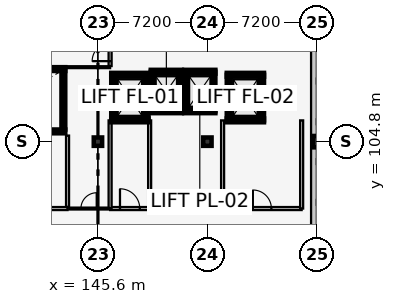
"""IFC4 building model, lengths in metres.
Left out: names, types, materials, properties, quantities, classifications, styles, units other than length and angle.
Written with IfcOpenShell. Run it as: python <this file> out.ifc"""

import sys

from ifc_helpers import new_model, si_unit, direction, frame, frame_2d, origin, origin_2d, place, context, subcontext, project, spatial, rectangle, extrude, element, fill, save


model = new_model("IFC4")
c1 = context("Model", 3, precision=1e-05, world=origin(), true_north=direction((0.0, 1.0)))
c2 = subcontext(c1, "Body", "Model", "MODEL_VIEW")
j1 = project(units=[si_unit("LENGTHUNIT", "METRE"), si_unit("PLANEANGLEUNIT", "RADIAN")], contexts=[c1])
p1 = place(None, origin())
s1 = spatial("IfcSite", under=j1, at=p1, CompositionType="ELEMENT")
p2 = place(p1, origin())
s2 = spatial("IfcBuilding", under=s1, at=p2, CompositionType="ELEMENT")
p3 = place(p2, frame((0.0, 0.0, 25.8)))
s3 = spatial("IfcBuildingStorey", under=s2, at=p3, CompositionType="ELEMENT", Elevation=25.8)
for number, where, z_axis, x_axis in (
    (1, (145.6, 104.8, 0.0), (0.0, 0.0, 1.0), (1.0, 0.0, 0.0)),
    (2, (152.8, 104.8, 0.0), (0.0, 0.0, 1.0), (1.0, 0.0, 0.0)),
):
    element("IfcColumn", number, at=place(p3, frame(where, z_axis=z_axis, x_axis=x_axis)), inside=s3, PredefinedType="COLUMN", context=c2, shape_type="SweptSolid", body=[
        extrude(rectangle(XDim=0.55, YDim=0.55, at=origin_2d()), origin(), (0.0, 0.0, 1.0), 3.9),
    ])
p4 = place(p3, frame((160.0, 104.8, 0.0), z_axis=(0.0, 0.0, 1.0), x_axis=(1.0, 0.0, 0.0)))
e3 = element("IfcColumn", 3, at=p4, inside=s3, PredefinedType="COLUMN", context=c2, shape_type="SweptSolid", body=[
    extrude(rectangle(XDim=0.5, YDim=0.75, at=origin_2d()), origin(), (0.0, 0.0, 1.0), 3.9),
])
p5 = place(p3, frame((159.81, 112.0, 0.0), z_axis=(0.0, 0.0, 1.0), x_axis=(0.0, -1.0, 0.0)))
e4 = element("IfcWall", 4, at=p5, inside=s3, PredefinedType="SOLIDWALL", context=c2, shape_type="SweptSolid", body=[
    extrude(rectangle(XDim=28.8, YDim=0.38, at=frame_2d((14.4, 0.0))), origin(), (0.0, 0.0, 1.0), 3.045),
])
for number, where, z_axis, x_axis in (
    (5, (134.55, 105.475, 0.0), (0.0, 0.0, 1.0), (1.0, 0.0, 0.0)),
    (6, (143.45, 109.575, 0.0), (0.0, 0.0, 1.0), (-1.0, 0.0, 0.0)),
):
    element("IfcWall", number, at=place(p3, frame(where, z_axis=z_axis, x_axis=x_axis)), inside=s3, PredefinedType="SHEAR", context=c2, shape_type="SweptSolid", body=[
        extrude(rectangle(XDim=8.9, YDim=0.25, at=frame_2d((4.45, 0.0))), origin(), (0.0, 0.0, 1.0), 3.65),
    ])
p6 = place(p3, frame((143.325, 105.6, 0.0), z_axis=(0.0, 0.0, 1.0), x_axis=(0.0, 1.0, 0.0)))
e7 = element("IfcWall", 7, at=p6, inside=s3, PredefinedType="SHEAR", context=c2, shape_type="SweptSolid", body=[
    extrude(rectangle(XDim=3.85, YDim=0.25, at=frame_2d((1.925, 0.0))), origin(), (0.0, 0.0, 1.0), 3.65),
])
p7 = place(p3, frame((146.475, 106.2, 0.0), z_axis=(0.0, 0.0, 1.0), x_axis=(1.0, 0.0, 0.0)))
e8 = element("IfcWall", 8, at=p7, inside=s3, PredefinedType="SHEAR", context=c2, shape_type="SweptSolid", body=[
    extrude(rectangle(XDim=2.45, YDim=0.25, at=frame_2d((1.225, 0.0))), origin(), (0.0, 0.0, 1.0), 3.65),
])
p8 = place(p7, frame((0.675, 0.0, 0.0)))
e9 = element("IfcOpeningElement", 9, at=p8, cuts=e8, PredefinedType="OPENING", context=c2, shape_type="SweptSolid", body=[
    extrude(rectangle(XDim=1.1, YDim=2.15, at=frame_2d((0.55, 1.075))), frame((0.0, 0.137, 0.0), z_axis=(0.0, -1.0, 0.0), x_axis=(1.0, 0.0, 0.0)), (0.0, 0.0, 1.0), 0.274),
])
p9 = place(p3, frame((148.925, 109.2, 0.0), z_axis=(0.0, 0.0, 1.0), x_axis=(-1.0, 0.0, 0.0)))
e10 = element("IfcWall", 10, at=p9, inside=s3, PredefinedType="SHEAR", context=c2, shape_type="SweptSolid", body=[
    extrude(rectangle(XDim=2.45, YDim=0.25, at=frame_2d((1.225, 0.0))), origin(), (0.0, 0.0, 1.0), 3.65),
])
for number, where, z_axis, x_axis in (
    (11, (146.6, 109.2, 0.0), (0.0, 0.0, 1.0), (0.0, -1.0, 0.0)),
    (12, (148.8, 106.2, 0.0), (0.0, 0.0, 1.0), (0.0, 1.0, 0.0)),
):
    element("IfcWall", number, at=place(p3, frame(where, z_axis=z_axis, x_axis=x_axis)), inside=s3, PredefinedType="SHEAR", context=c2, shape_type="SweptSolid", body=[
        extrude(rectangle(XDim=3.0, YDim=0.25, at=frame_2d((1.5, 0.0))), origin(), (0.0, 0.0, 1.0), 3.65),
    ])
p10 = place(p3, frame((146.4, 100.4, 0.0), z_axis=(0.0, 0.0, 1.0), x_axis=(1.0, 0.0, 0.0)))
e13 = element("IfcWall", 13, at=p10, inside=s3, PredefinedType="PARTITIONING", context=c2, shape_type="SweptSolid", body=[
    extrude(rectangle(XDim=2.6, YDim=0.2, at=frame_2d((1.3, 0.0))), origin(), (0.0, 0.0, 1.0), 3.65),
])
p11 = place(p10, frame((0.65, 0.0, 0.0)))
e14 = element("IfcOpeningElement", 14, at=p11, cuts=e13, PredefinedType="OPENING", context=c2, shape_type="SweptSolid", body=[
    extrude(rectangle(XDim=1.3, YDim=2.2, at=frame_2d((0.65, 1.1))), frame((0.0, 0.112, 0.0), z_axis=(0.0, -1.0, 0.0), x_axis=(1.0, 0.0, 0.0)), (0.0, 0.0, 1.0), 0.224),
])
p12 = place(p3, frame((146.4, 106.2, 0.0), z_axis=(0.0, 0.0, 1.0), x_axis=(0.0, -1.0, 0.0)))
e15 = element("IfcWall", 15, at=p12, inside=s3, PredefinedType="PARTITIONING", context=c2, shape_type="SweptSolid", body=[
    extrude(rectangle(XDim=5.8, YDim=0.2, at=frame_2d((2.9, 0.0))), origin(), (0.0, 0.0, 1.0), 3.65),
])
p13 = place(p3, frame((149.0, 100.4, 0.0), z_axis=(0.0, 0.0, 1.0), x_axis=(0.0, 1.0, 0.0)))
e16 = element("IfcWall", 16, at=p13, inside=s3, PredefinedType="PARTITIONING", context=c2, shape_type="SweptSolid", body=[
    extrude(rectangle(XDim=5.8, YDim=0.2, at=frame_2d((2.9, 0.0))), origin(), (0.0, 0.0, 1.0), 3.395),
])
p14 = place(p3, frame((154.075, 106.2, 0.0), z_axis=(0.0, 0.0, 1.0), x_axis=(1.0, 0.0, 0.0)))
e17 = element("IfcWall", 17, at=p14, inside=s3, PredefinedType="SHEAR", context=c2, shape_type="SweptSolid", body=[
    extrude(rectangle(XDim=2.45, YDim=0.25, at=frame_2d((1.225, 0.0))), origin(), (0.0, 0.0, 1.0), 3.65),
])
p15 = place(p14, frame((0.675, 0.0, 0.0)))
e18 = element("IfcOpeningElement", 18, at=p15, cuts=e17, PredefinedType="OPENING", context=c2, shape_type="SweptSolid", body=[
    extrude(rectangle(XDim=1.1, YDim=2.15, at=frame_2d((0.55, 1.075))), frame((0.0, 0.137, 0.0), z_axis=(0.0, -1.0, 0.0), x_axis=(1.0, 0.0, 0.0)), (0.0, 0.0, 1.0), 0.274),
])
p16 = place(p3, frame((156.525, 109.2, 0.0), z_axis=(0.0, 0.0, 1.0), x_axis=(-1.0, 0.0, 0.0)))
e19 = element("IfcWall", 19, at=p16, inside=s3, PredefinedType="SHEAR", context=c2, shape_type="SweptSolid", body=[
    extrude(rectangle(XDim=2.45, YDim=0.25, at=frame_2d((1.225, 0.0))), origin(), (0.0, 0.0, 1.0), 3.65),
])
for number, where, z_axis, x_axis in (
    (20, (154.2, 109.2, 0.0), (0.0, 0.0, 1.0), (0.0, -1.0, 0.0)),
    (21, (156.4, 106.2, 0.0), (0.0, 0.0, 1.0), (0.0, 1.0, 0.0)),
):
    element("IfcWall", number, at=place(p3, frame(where, z_axis=z_axis, x_axis=x_axis)), inside=s3, PredefinedType="SHEAR", context=c2, shape_type="SweptSolid", body=[
        extrude(rectangle(XDim=3.0, YDim=0.25, at=frame_2d((1.5, 0.0))), origin(), (0.0, 0.0, 1.0), 3.65),
    ])
p17 = place(p3, frame((153.8, 100.4, 0.0), z_axis=(0.0, 0.0, 1.0), x_axis=(1.0, 0.0, 0.0)))
e22 = element("IfcWall", 22, at=p17, inside=s3, PredefinedType="PARTITIONING", context=c2, shape_type="SweptSolid", body=[
    extrude(rectangle(XDim=5.2, YDim=0.2, at=frame_2d((2.6, 0.0))), origin(), (0.0, 0.0, 1.0), 3.65),
])
p18 = place(p17, frame((1.99, 0.0, 0.0)))
e23 = element("IfcOpeningElement", 23, at=p18, cuts=e22, PredefinedType="OPENING", context=c2, shape_type="SweptSolid", body=[
    extrude(rectangle(XDim=1.22, YDim=2.2, at=frame_2d((0.61, 1.1))), frame((0.0, 0.112, 0.0), z_axis=(0.0, -1.0, 0.0), x_axis=(1.0, 0.0, 0.0)), (0.0, 0.0, 1.0), 0.224),
])
for number, where, z_axis, x_axis in (
    (24, (153.8, 106.2, 0.0), (0.0, 0.0, 1.0), (0.0, -1.0, 0.0)),
    (25, (159.0, 100.4, 0.0), (0.0, 0.0, 1.0), (0.0, 1.0, 0.0)),
):
    element("IfcWall", number, at=place(p3, frame(where, z_axis=z_axis, x_axis=x_axis)), inside=s3, PredefinedType="PARTITIONING", context=c2, shape_type="SweptSolid", body=[
        extrude(rectangle(XDim=5.8, YDim=0.2, at=frame_2d((2.9, 0.0))), origin(), (0.0, 0.0, 1.0), 3.65),
    ])
p19 = place(p3, frame((149.075, 106.8, 0.0), z_axis=(0.0, 0.0, 1.0), x_axis=(1.0, 0.0, 0.0)))
e26 = element("IfcWall", 26, at=p19, inside=s3, PredefinedType="SHEAR", context=c2, shape_type="SweptSolid", body=[
    extrude(rectangle(XDim=2.05, YDim=0.25, at=frame_2d((1.025, 0.0))), origin(), (0.0, 0.0, 1.0), 3.65),
])
p20 = place(p19, frame((0.525, 0.0, 0.0)))
e27 = element("IfcOpeningElement", 27, at=p20, cuts=e26, PredefinedType="OPENING", context=c2, shape_type="SweptSolid", body=[
    extrude(rectangle(XDim=1.0, YDim=2.15, at=frame_2d((0.5, 1.075))), frame((0.0, 0.137, 0.0), z_axis=(0.0, -1.0, 0.0), x_axis=(1.0, 0.0, 0.0)), (0.0, 0.0, 1.0), 0.274),
])
p21 = place(p3, frame((151.125, 109.4, 0.0), z_axis=(0.0, 0.0, 1.0), x_axis=(-1.0, 0.0, 0.0)))
e28 = element("IfcWall", 28, at=p21, inside=s3, PredefinedType="SHEAR", context=c2, shape_type="SweptSolid", body=[
    extrude(rectangle(XDim=2.05, YDim=0.25, at=frame_2d((1.025, 0.0))), origin(), (0.0, 0.0, 1.0), 3.65),
])
for number, where, z_axis, x_axis in (
    (29, (149.2, 109.4, 0.0), (0.0, 0.0, 1.0), (0.0, -1.0, 0.0)),
    (30, (151.0, 106.8, 0.0), (0.0, 0.0, 1.0), (0.0, 1.0, 0.0)),
):
    element("IfcWall", number, at=place(p3, frame(where, z_axis=z_axis, x_axis=x_axis)), inside=s3, PredefinedType="SHEAR", context=c2, shape_type="SweptSolid", body=[
        extrude(rectangle(XDim=2.6, YDim=0.25, at=frame_2d((1.3, 0.0))), origin(), (0.0, 0.0, 1.0), 3.65),
    ])
p22 = place(p3, frame((151.275, 106.8, 0.0), z_axis=(0.0, 0.0, 1.0), x_axis=(1.0, 0.0, 0.0)))
e31 = element("IfcWall", 31, at=p22, inside=s3, PredefinedType="SHEAR", context=c2, shape_type="SweptSolid", body=[
    extrude(rectangle(XDim=2.05, YDim=0.25, at=frame_2d((1.025, 0.0))), origin(), (0.0, 0.0, 1.0), 3.65),
])
p23 = place(p22, frame((0.525, 0.0, 0.0)))
e32 = element("IfcOpeningElement", 32, at=p23, cuts=e31, PredefinedType="OPENING", context=c2, shape_type="SweptSolid", body=[
    extrude(rectangle(XDim=1.0, YDim=2.15, at=frame_2d((0.5, 1.075))), frame((0.0, 0.137, 0.0), z_axis=(0.0, -1.0, 0.0), x_axis=(1.0, 0.0, 0.0)), (0.0, 0.0, 1.0), 0.274),
])
p24 = place(p3, frame((153.325, 109.4, 0.0), z_axis=(0.0, 0.0, 1.0), x_axis=(-1.0, 0.0, 0.0)))
e33 = element("IfcWall", 33, at=p24, inside=s3, PredefinedType="SHEAR", context=c2, shape_type="SweptSolid", body=[
    extrude(rectangle(XDim=2.05, YDim=0.25, at=frame_2d((1.025, 0.0))), origin(), (0.0, 0.0, 1.0), 3.65),
])
for number, where, z_axis, x_axis in (
    (34, (151.4, 109.4, 0.0), (0.0, 0.0, 1.0), (0.0, -1.0, 0.0)),
    (35, (153.2, 106.8, 0.0), (0.0, 0.0, 1.0), (0.0, 1.0, 0.0)),
):
    element("IfcWall", number, at=place(p3, frame(where, z_axis=z_axis, x_axis=x_axis)), inside=s3, PredefinedType="SHEAR", context=c2, shape_type="SweptSolid", body=[
        extrude(rectangle(XDim=2.6, YDim=0.25, at=frame_2d((1.3, 0.0))), origin(), (0.0, 0.0, 1.0), 3.65),
    ])
p25 = place(p3, frame((137.48, 100.4, 0.0), z_axis=(0.0, 0.0, 1.0), x_axis=(1.0, 0.0, 0.0)))
e36 = element("IfcWall", 36, at=p25, inside=s3, PredefinedType="PARTITIONING", context=c2, shape_type="SweptSolid", body=[
    extrude(rectangle(XDim=6.12, YDim=0.2, at=frame_2d((3.06, 0.0))), origin(), (0.0, 0.0, 1.0), 3.65),
])
p26 = place(p25, frame((2.22, 0.0, 0.0)))
e37 = element("IfcOpeningElement", 37, at=p26, cuts=e36, PredefinedType="OPENING", context=c2, shape_type="SweptSolid", body=[
    extrude(rectangle(XDim=1.68, YDim=2.3, at=frame_2d((0.84, 1.15))), frame((0.0, 0.112, 0.0), z_axis=(0.0, -1.0, 0.0), x_axis=(1.0, 0.0, 0.0)), (0.0, 0.0, 1.0), 0.224),
])
p27 = place(p3, frame((143.6, 100.51, 0.0), z_axis=(0.0, 0.0, 1.0), x_axis=(0.0, 1.0, 0.0)))
e38 = element("IfcWall", 38, at=p27, inside=s3, PredefinedType="PARTITIONING", context=c2, shape_type="SweptSolid", body=[
    extrude(rectangle(XDim=4.69, YDim=0.2, at=frame_2d((2.345, 0.0))), origin(), (0.0, 0.0, 1.0), 3.65),
])
p28 = place(p3, frame((143.71, 100.4, 0.0), z_axis=(0.0, 0.0, 1.0), x_axis=(1.0, 0.0, 0.0)))
e39 = element("IfcWall", 39, at=p28, inside=s3, PredefinedType="PARTITIONING", context=c2, shape_type="SweptSolid", body=[
    extrude(rectangle(XDim=2.58, YDim=0.125, at=frame_2d((1.29, 0.0))), origin(), (0.0, 0.0, 1.0), 3.65),
])
p29 = place(p28, frame((0.77, 0.0, 0.0)))
e40 = element("IfcOpeningElement", 40, at=p29, cuts=e39, PredefinedType="OPENING", context=c2, shape_type="SweptSolid", body=[
    extrude(rectangle(XDim=1.04, YDim=2.15, at=frame_2d((0.52, 1.075))), frame((0.0, 0.074, 0.0), z_axis=(0.0, -1.0, 0.0), x_axis=(1.0, 0.0, 0.0)), (0.0, 0.0, 1.0), 0.149),
])
p30 = place(p3, frame((143.6, 109.7, 0.0), z_axis=(0.0, 0.0, 1.0), x_axis=(1.0, 0.0, 0.0)))
e41 = element("IfcWall", 41, at=p30, inside=s3, PredefinedType="PARTITIONING", context=c2, shape_type="SweptSolid", body=[
    extrude(rectangle(XDim=2.8, YDim=0.125, at=frame_2d((1.4, 0.0))), origin(), (0.0, 0.0, 1.0), 3.65),
])
p31 = place(p3, frame((146.4, 109.772, 0.0), z_axis=(0.0, 0.0, 1.0), x_axis=(0.0, 1.0, 0.0)))
e42 = element("IfcWall", 42, at=p31, inside=s3, PredefinedType="PARTITIONING", context=c2, shape_type="SweptSolid", body=[
    extrude(rectangle(XDim=1.828, YDim=0.2, at=frame_2d((0.914, 0.0))), origin(), (0.0, 0.0, 1.0), 3.65),
])
p32 = place(p31, frame((0.324, 0.0, 0.0)))
e43 = element("IfcOpeningElement", 43, at=p32, cuts=e42, PredefinedType="OPENING", context=c2, shape_type="SweptSolid", body=[
    extrude(rectangle(XDim=1.18, YDim=2.2, at=frame_2d((0.59, 1.1))), frame((0.0, 0.112, 0.0), z_axis=(0.0, -1.0, 0.0), x_axis=(1.0, 0.0, 0.0)), (0.0, 0.0, 1.0), 0.224),
])
p33 = place(p8, origin())
e44 = element("IfcDoor", 44, at=p33, inside=s3, OperationType="SLIDING_TO_LEFT", PredefinedType="DOOR", context=c2, shape_type="SweptSolid", body=[
    extrude(rectangle(XDim=1.1, YDim=2.15, at=frame_2d((0.55, 1.075))), frame((0.0, 0.025, 0.0), z_axis=(0.0, -1.0, 0.0), x_axis=(1.0, 0.0, 0.0)), (0.0, 0.0, 1.0), 0.05),
])
fill(e9, e44)
p34 = place(p11, origin())
e45 = element("IfcDoor", 45, at=p34, inside=s3, OperationType="SINGLE_SWING_LEFT", PredefinedType="DOOR", context=c2, shape_type="SweptSolid", body=[
    extrude(rectangle(XDim=1.3, YDim=2.2, at=frame_2d((0.65, 1.1))), frame((0.0, 0.025, 0.0), z_axis=(0.0, -1.0, 0.0), x_axis=(1.0, 0.0, 0.0)), (0.0, 0.0, 1.0), 0.05),
])
fill(e14, e45)
p35 = place(p15, origin())
e46 = element("IfcDoor", 46, at=p35, inside=s3, OperationType="SLIDING_TO_LEFT", PredefinedType="DOOR", context=c2, shape_type="SweptSolid", body=[
    extrude(rectangle(XDim=1.1, YDim=2.15, at=frame_2d((0.55, 1.075))), frame((0.0, 0.025, 0.0), z_axis=(0.0, -1.0, 0.0), x_axis=(1.0, 0.0, 0.0)), (0.0, 0.0, 1.0), 0.05),
])
fill(e18, e46)
p36 = place(p18, origin())
e47 = element("IfcDoor", 47, at=p36, inside=s3, OperationType="SINGLE_SWING_LEFT", PredefinedType="DOOR", context=c2, shape_type="SweptSolid", body=[
    extrude(rectangle(XDim=1.22, YDim=2.2, at=frame_2d((0.61, 1.1))), frame((0.0, 0.025, 0.0), z_axis=(0.0, -1.0, 0.0), x_axis=(1.0, 0.0, 0.0)), (0.0, 0.0, 1.0), 0.05),
])
fill(e23, e47)
p37 = place(p20, origin())
e48 = element("IfcDoor", 48, at=p37, inside=s3, OperationType="SLIDING_TO_LEFT", PredefinedType="DOOR", context=c2, shape_type="SweptSolid", body=[
    extrude(rectangle(XDim=1.0, YDim=2.15, at=frame_2d((0.5, 1.075))), frame((0.0, 0.025, 0.0), z_axis=(0.0, -1.0, 0.0), x_axis=(1.0, 0.0, 0.0)), (0.0, 0.0, 1.0), 0.05),
])
fill(e27, e48)
p38 = place(p23, origin())
e49 = element("IfcDoor", 49, at=p38, inside=s3, OperationType="SLIDING_TO_LEFT", PredefinedType="DOOR", context=c2, shape_type="SweptSolid", body=[
    extrude(rectangle(XDim=1.0, YDim=2.15, at=frame_2d((0.5, 1.075))), frame((0.0, 0.025, 0.0), z_axis=(0.0, -1.0, 0.0), x_axis=(1.0, 0.0, 0.0)), (0.0, 0.0, 1.0), 0.05),
])
fill(e32, e49)
p39 = place(p29, origin())
e50 = element("IfcDoor", 50, at=p39, inside=s3, OperationType="SINGLE_SWING_RIGHT", PredefinedType="DOOR", context=c2, shape_type="SweptSolid", body=[
    extrude(rectangle(XDim=1.04, YDim=2.15, at=frame_2d((0.52, 1.075))), frame((0.0, 0.025, 0.0), z_axis=(0.0, -1.0, 0.0), x_axis=(1.0, 0.0, 0.0)), (0.0, 0.0, 1.0), 0.05),
])
fill(e40, e50)
p40 = place(p32, origin())
e51 = element("IfcDoor", 51, at=p40, inside=s3, OperationType="SINGLE_SWING_LEFT", PredefinedType="DOOR", context=c2, shape_type="SweptSolid", body=[
    extrude(rectangle(XDim=1.18, YDim=2.2, at=frame_2d((0.59, 1.1))), frame((0.0, 0.025, 0.0), z_axis=(0.0, -1.0, 0.0), x_axis=(1.0, 0.0, 0.0)), (0.0, 0.0, 1.0), 0.05),
])
fill(e43, e51)
save(model, sys.argv[1])
